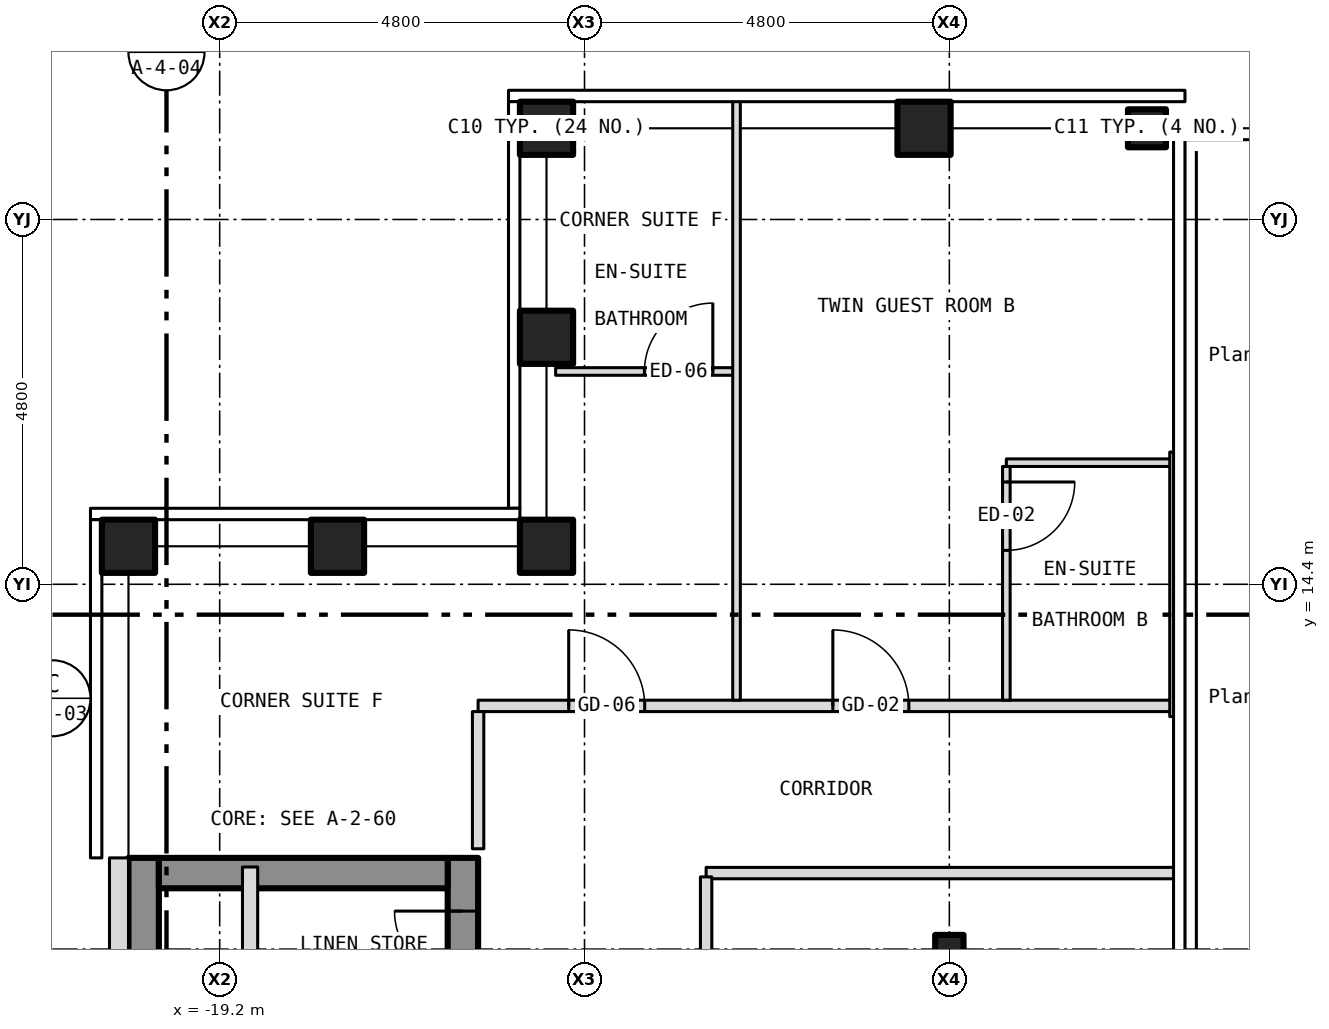
"""IFC4 building model, lengths in metres.
Left out: names, types, materials, properties, quantities, classifications, styles, units other than length and angle.
Written with IfcOpenShell. Run it as: python <this file> out.ifc"""

import sys

from ifc_helpers import new_model, si_unit, direction, frame, frame_2d, origin, origin_2d, place, context, subcontext, project, spatial, rectangle, hollow_rectangle, i_section, extrude, element, fill, save


model = new_model("IFC4")
c1 = context("Model", 3, precision=1e-05, world=origin(), true_north=direction((0.0, 1.0)))
c2 = subcontext(c1, "Body", "Model", "MODEL_VIEW")
j1 = project(units=[si_unit("LENGTHUNIT", "METRE"), si_unit("PLANEANGLEUNIT", "RADIAN")], contexts=[c1])
p1 = place(None, origin())
s1 = spatial("IfcSite", under=j1, at=p1, CompositionType="ELEMENT")
p2 = place(p1, origin())
s2 = spatial("IfcBuilding", under=s1, at=p2, CompositionType="ELEMENT")
p3 = place(p2, frame((0.0, 0.0, 219.0)))
s3 = spatial("IfcBuildingStorey", under=s2, at=p3, CompositionType="ELEMENT", Elevation=219.0)
for number, where, z_axis, x_axis in (
    (1, (-14.9, 20.4, -0.15), (0.0, 0.0, 1.0), (1.0, 0.0, 0.0)),
    (2, (-9.933, 20.4, -0.15), (0.0, 0.0, 1.0), (1.0, 0.0, 0.0)),
    (3, (-20.4, 14.9, -0.15), (0.0, 0.0, 1.0), (1.0, 0.0, 0.0)),
    (4, (-14.9, 14.9, -0.15), (0.0, 0.0, 1.0), (1.0, 0.0, 0.0)),
    (5, (-14.9, 17.65, -0.15), (0.0, 0.0, 1.0), (1.0, 0.0, 0.0)),
    (6, (-17.65, 14.9, -0.15), (0.0, 0.0, 1.0), (1.0, 0.0, 0.0)),
):
    element("IfcColumn", number, at=place(p3, frame(where, z_axis=z_axis, x_axis=x_axis)), inside=s3, PredefinedType="COLUMN", context=c2, shape_type="SweptSolid", body=[
        extrude(hollow_rectangle(XDim=0.7, YDim=0.7, WallThickness=0.04, at=origin_2d()), origin(), (0.0, 0.0, 1.0), 3.5),
    ])
p4 = place(p3, frame((-7.0, 20.4, -0.15), z_axis=(0.0, 0.0, 1.0), x_axis=(1.0, 0.0, 0.0)))
e7 = element("IfcColumn", 7, at=p4, inside=s3, PredefinedType="COLUMN", context=c2, shape_type="SweptSolid", body=[
    extrude(hollow_rectangle(XDim=0.5, YDim=0.5, WallThickness=0.03, at=origin_2d()), origin(), (0.0, 0.0, 1.0), 3.5),
])
p5 = place(p3, frame((-9.6, 9.6, -0.15), z_axis=(0.0, 0.0, 1.0), x_axis=(1.0, 0.0, 0.0)))
e8 = element("IfcColumn", 8, at=p5, inside=s3, PredefinedType="COLUMN", context=c2, shape_type="SweptSolid", body=[
    extrude(i_section(OverallWidth=0.373, OverallDepth=0.373, WebThickness=0.016, FlangeThickness=0.026, at=origin_2d()), origin(), (0.0, 0.0, 1.0), 3.5),
])
p6 = place(p3, frame((-16.0, -10.8, 0.0), z_axis=(0.0, 0.0, 1.0), x_axis=(0.0, 1.0, 0.0)))
e9 = element("IfcWall", 9, at=p6, inside=s3, PredefinedType="SHEAR", context=c2, shape_type="SweptSolid", body=[
    extrude(rectangle(XDim=21.6, YDim=0.4, at=frame_2d((10.8, 0.0))), origin(), (0.0, 0.0, 1.0), 3.25),
])
p7 = place(p6, frame((9.4, 0.0, 0.0)))
e10 = element("IfcOpeningElement", 10, at=p7, cuts=e9, PredefinedType="OPENING", context=c2, shape_type="SweptSolid", body=[
    extrude(rectangle(XDim=1.1, YDim=2.1, at=frame_2d((0.55, 1.05))), frame((0.0, 0.212, 0.0), z_axis=(0.0, -1.0, 0.0), x_axis=(1.0, 0.0, 0.0)), (0.0, 0.0, 1.0), 0.424),
])
p8 = place(p6, frame((11.5, 0.0, 0.0)))
e11 = element("IfcOpeningElement", 11, at=p8, cuts=e9, PredefinedType="OPENING", context=c2, shape_type="SweptSolid", body=[
    extrude(rectangle(XDim=1.1, YDim=2.1, at=frame_2d((0.55, 1.05))), frame((0.0, 0.212, 0.0), z_axis=(0.0, -1.0, 0.0), x_axis=(1.0, 0.0, 0.0)), (0.0, 0.0, 1.0), 0.424),
])
p9 = place(p6, frame((13.6, 0.0, 0.0)))
e12 = element("IfcOpeningElement", 12, at=p9, cuts=e9, PredefinedType="OPENING", context=c2, shape_type="SweptSolid", body=[
    extrude(rectangle(XDim=1.1, YDim=2.1, at=frame_2d((0.55, 1.05))), frame((0.0, 0.212, 0.0), z_axis=(0.0, -1.0, 0.0), x_axis=(1.0, 0.0, 0.0)), (0.0, 0.0, 1.0), 0.424),
])
p10 = place(p6, frame((15.7, 0.0, 0.0)))
e13 = element("IfcOpeningElement", 13, at=p10, cuts=e9, PredefinedType="OPENING", context=c2, shape_type="SweptSolid", body=[
    extrude(rectangle(XDim=1.1, YDim=2.1, at=frame_2d((0.55, 1.05))), frame((0.0, 0.212, 0.0), z_axis=(0.0, -1.0, 0.0), x_axis=(1.0, 0.0, 0.0)), (0.0, 0.0, 1.0), 0.424),
])
p11 = place(p6, frame((17.8, 0.0, 0.0)))
e14 = element("IfcOpeningElement", 14, at=p11, cuts=e9, PredefinedType="OPENING", context=c2, shape_type="SweptSolid", body=[
    extrude(rectangle(XDim=1.1, YDim=2.1, at=frame_2d((0.55, 1.05))), frame((0.0, 0.212, 0.0), z_axis=(0.0, -1.0, 0.0), x_axis=(1.0, 0.0, 0.0)), (0.0, 0.0, 1.0), 0.424),
])
p12 = place(p6, frame((0.458, 0.0, 0.0)))
e15 = element("IfcOpeningElement", 15, at=p12, cuts=e9, PredefinedType="OPENING", context=c2, shape_type="SweptSolid", body=[
    extrude(rectangle(XDim=1.1, YDim=2.1, at=frame_2d((0.55, 1.05))), frame((0.0, 0.212, 0.0), z_axis=(0.0, -1.0, 0.0), x_axis=(1.0, 0.0, 0.0)), (0.0, 0.0, 1.0), 0.424),
])
p13 = place(p6, frame((7.5, 0.0, 0.0)))
e16 = element("IfcOpeningElement", 16, at=p13, cuts=e9, PredefinedType="OPENING", context=c2, shape_type="SweptSolid", body=[
    extrude(rectangle(XDim=1.1, YDim=2.1, at=frame_2d((0.55, 1.05))), frame((0.0, 0.212, 0.0), z_axis=(0.0, -1.0, 0.0), x_axis=(1.0, 0.0, 0.0)), (0.0, 0.0, 1.0), 0.424),
])
p14 = place(p6, frame((20.0, 0.0, 0.0)))
e17 = element("IfcOpeningElement", 17, at=p14, cuts=e9, PredefinedType="OPENING", context=c2, shape_type="SweptSolid", body=[
    extrude(rectangle(XDim=0.9, YDim=2.1, at=frame_2d((0.45, 1.05))), frame((0.0, 0.212, 0.0), z_axis=(0.0, -1.0, 0.0), x_axis=(1.0, 0.0, 0.0)), (0.0, 0.0, 1.0), 0.424),
])
p15 = place(p3, frame((-20.2, -10.8, 0.0), z_axis=(0.0, 0.0, 1.0), x_axis=(0.0, 1.0, 0.0)))
e18 = element("IfcWall", 18, at=p15, inside=s3, PredefinedType="SHEAR", context=c2, shape_type="SweptSolid", body=[
    extrude(rectangle(XDim=21.6, YDim=0.4, at=frame_2d((10.8, 0.0))), origin(), (0.0, 0.0, 1.0), 3.25),
])
p16 = place(p3, frame((-20.0, 10.6, 0.0), z_axis=(0.0, 0.0, 1.0), x_axis=(1.0, 0.0, 0.0)))
e19 = element("IfcWall", 19, at=p16, inside=s3, PredefinedType="SHEAR", context=c2, shape_type="SweptSolid", body=[
    extrude(rectangle(XDim=3.8, YDim=0.4, at=frame_2d((1.9, 0.0))), origin(), (0.0, 0.0, 1.0), 3.25),
])
p17 = place(p3, frame((-20.525, 10.8, 0.0), z_axis=(0.0, 0.0, 1.0), x_axis=(0.0, -1.0, 0.0)))
e20 = element("IfcWall", 20, at=p17, inside=s3, PredefinedType="SOLIDWALL", context=c2, shape_type="SweptSolid", body=[
    extrude(rectangle(XDim=21.6, YDim=0.25, at=frame_2d((10.8, 0.0))), origin(), (0.0, 0.0, 1.0), 3.5),
])
p18 = place(p17, frame((18.05, 0.0, 1.0)))
e21 = element("IfcOpeningElement", 21, at=p18, cuts=e20, PredefinedType="OPENING", context=c2, shape_type="SweptSolid", body=[
    extrude(rectangle(XDim=0.6, YDim=1.5, at=frame_2d((0.3, 0.75))), frame((0.0, 0.137, 0.0), z_axis=(0.0, -1.0, 0.0), x_axis=(1.0, 0.0, 0.0)), (0.0, 0.0, 1.0), 0.274),
])
p19 = place(p3, frame((-12.8, 10.6, 0.0), z_axis=(0.0, 0.0, 1.0), x_axis=(1.0, 0.0, 0.0)))
e22 = element("IfcWall", 22, at=p19, inside=s3, PredefinedType="PARTITIONING", context=c2, shape_type="SweptSolid", body=[
    extrude(rectangle(XDim=6.18, YDim=0.15, at=frame_2d((3.09, 0.0))), origin(), (0.0, 0.0, 1.0), 3.35),
])
p20 = place(p3, frame((-15.8, 12.8, 0.0), z_axis=(0.0, 0.0, 1.0), x_axis=(1.0, 0.0, 0.0)))
e23 = element("IfcWall", 23, at=p20, inside=s3, PredefinedType="PARTITIONING", context=c2, shape_type="SweptSolid", body=[
    extrude(rectangle(XDim=9.15, YDim=0.15, at=frame_2d((4.575, 0.0))), origin(), (0.0, 0.0, 1.0), 3.35),
])
p21 = place(p20, frame((4.667, 0.0, 0.0)))
e24 = element("IfcOpeningElement", 24, at=p21, cuts=e23, PredefinedType="OPENING", context=c2, shape_type="SweptSolid", body=[
    extrude(rectangle(XDim=1.0, YDim=2.1, at=frame_2d((0.5, 1.05))), frame((0.0, 0.087, 0.0), z_axis=(0.0, -1.0, 0.0), x_axis=(1.0, 0.0, 0.0)), (0.0, 0.0, 1.0), 0.174),
])
p22 = place(p20, frame((1.192, 0.0, 0.0)))
e25 = element("IfcOpeningElement", 25, at=p22, cuts=e23, PredefinedType="OPENING", context=c2, shape_type="SweptSolid", body=[
    extrude(rectangle(XDim=1.0, YDim=2.1, at=frame_2d((0.5, 1.05))), frame((0.0, 0.087, 0.0), z_axis=(0.0, -1.0, 0.0), x_axis=(1.0, 0.0, 0.0)), (0.0, 0.0, 1.0), 0.174),
])
p23 = place(p3, frame((-8.85, 16.0, 0.0), z_axis=(0.0, 0.0, 1.0), x_axis=(1.0, 0.0, 0.0)))
e26 = element("IfcWall", 26, at=p23, inside=s3, PredefinedType="PARTITIONING", context=c2, shape_type="SweptSolid", body=[
    extrude(rectangle(XDim=2.2, YDim=0.1, at=frame_2d((1.1, 0.0))), origin(), (0.0, 0.0, 1.0), 3.35),
])
p24 = place(p3, frame((-14.78, 17.2, 0.0), z_axis=(0.0, 0.0, 1.0), x_axis=(1.0, 0.0, 0.0)))
e27 = element("IfcWall", 27, at=p24, inside=s3, PredefinedType="PARTITIONING", context=c2, shape_type="SweptSolid", body=[
    extrude(rectangle(XDim=2.38, YDim=0.1, at=frame_2d((1.19, 0.0))), origin(), (0.0, 0.0, 1.0), 3.35),
])
p25 = place(p24, frame((1.168, 0.0, 0.0)))
e28 = element("IfcOpeningElement", 28, at=p25, cuts=e27, PredefinedType="OPENING", context=c2, shape_type="SweptSolid", body=[
    extrude(rectangle(XDim=0.9, YDim=2.1, at=frame_2d((0.45, 1.05))), frame((0.0, 0.062, 0.0), z_axis=(0.0, -1.0, 0.0), x_axis=(1.0, 0.0, 0.0)), (0.0, 0.0, 1.0), 0.124),
])
p26 = place(p3, frame((-18.8, -1.8, 0.0), z_axis=(0.0, 0.0, 1.0), x_axis=(0.0, 1.0, 0.0)))
e29 = element("IfcWall", 29, at=p26, inside=s3, PredefinedType="PARTITIONING", context=c2, shape_type="SweptSolid", body=[
    extrude(rectangle(XDim=12.48, YDim=0.2, at=frame_2d((6.24, 0.0))), origin(), (0.0, 0.0, 1.0), 3.25),
])
p27 = place(p3, frame((-15.8, 10.92, 0.0), z_axis=(0.0, 0.0, 1.0), x_axis=(0.0, 1.0, 0.0)))
e30 = element("IfcWall", 30, at=p27, inside=s3, PredefinedType="PARTITIONING", context=c2, shape_type="SweptSolid", body=[
    extrude(rectangle(XDim=1.805, YDim=0.15, at=frame_2d((0.903, 0.0))), origin(), (0.0, 0.0, 1.0), 3.35),
])
p28 = place(p3, frame((-12.8, 3.375, 0.0), z_axis=(0.0, 0.0, 1.0), x_axis=(0.0, 1.0, 0.0)))
e31 = element("IfcWall", 31, at=p28, inside=s3, PredefinedType="PARTITIONING", context=c2, shape_type="SweptSolid", body=[
    extrude(rectangle(XDim=7.175, YDim=0.15, at=frame_2d((3.587, 0.0))), origin(), (0.0, 0.0, 1.0), 3.35),
])
p29 = place(p28, frame((3.125, 0.0, 0.0)))
e32 = element("IfcOpeningElement", 32, at=p29, cuts=e31, PredefinedType="OPENING", context=c2, shape_type="SweptSolid", body=[
    extrude(rectangle(XDim=0.9, YDim=2.1, at=frame_2d((0.45, 1.05))), frame((0.0, 0.087, 0.0), z_axis=(0.0, -1.0, 0.0), x_axis=(1.0, 0.0, 0.0)), (0.0, 0.0, 1.0), 0.174),
])
p30 = place(p3, frame((-12.4, 12.875, 0.0), z_axis=(0.0, 0.0, 1.0), x_axis=(0.0, 1.0, 0.0)))
e33 = element("IfcWall", 33, at=p30, inside=s3, PredefinedType="PARTITIONING", context=c2, shape_type="SweptSolid", body=[
    extrude(rectangle(XDim=7.905, YDim=0.1, at=frame_2d((3.953, 0.0))), origin(), (0.0, 0.0, 1.0), 3.35),
])
p31 = place(p3, frame((-8.85, 12.875, 0.0), z_axis=(0.0, 0.0, 1.0), x_axis=(0.0, 1.0, 0.0)))
e34 = element("IfcWall", 34, at=p31, inside=s3, PredefinedType="PARTITIONING", context=c2, shape_type="SweptSolid", body=[
    extrude(rectangle(XDim=3.075, YDim=0.1, at=frame_2d((1.538, 0.0))), origin(), (0.0, 0.0, 1.0), 3.35),
])
p32 = place(p31, frame((1.971, 0.0, 0.0)))
e35 = element("IfcOpeningElement", 35, at=p32, cuts=e34, PredefinedType="OPENING", context=c2, shape_type="SweptSolid", body=[
    extrude(rectangle(XDim=0.9, YDim=2.1, at=frame_2d((0.45, 1.05))), frame((0.0, 0.062, 0.0), z_axis=(0.0, -1.0, 0.0), x_axis=(1.0, 0.0, 0.0)), (0.0, 0.0, 1.0), 0.124),
])
p33 = place(p3, frame((-6.65, 12.66, 0.0), z_axis=(0.0, 0.0, 1.0), x_axis=(0.0, 1.0, 0.0)))
e36 = element("IfcWall", 36, at=p33, inside=s3, PredefinedType="PARTITIONING", context=c2, shape_type="SweptSolid", body=[
    extrude(rectangle(XDim=3.48, YDim=0.1, at=frame_2d((1.74, 0.0))), origin(), (0.0, 0.0, 1.0), 3.35),
])
p34 = place(p14, origin())
e37 = element("IfcDoor", 37, at=p34, inside=s3, OperationType="SINGLE_SWING_RIGHT", PredefinedType="DOOR", context=c2, shape_type="SweptSolid", body=[
    extrude(rectangle(XDim=0.9, YDim=2.1, at=frame_2d((0.45, 1.05))), frame((0.0, 0.025, 0.0), z_axis=(0.0, -1.0, 0.0), x_axis=(1.0, 0.0, 0.0)), (0.0, 0.0, 1.0), 0.05),
])
fill(e17, e37)
p35 = place(p21, origin())
e38 = element("IfcDoor", 38, at=p35, inside=s3, OperationType="SINGLE_SWING_LEFT", PredefinedType="DOOR", context=c2, shape_type="SweptSolid", body=[
    extrude(rectangle(XDim=1.0, YDim=2.1, at=frame_2d((0.5, 1.05))), frame((0.0, 0.025, 0.0), z_axis=(0.0, -1.0, 0.0), x_axis=(1.0, 0.0, 0.0)), (0.0, 0.0, 1.0), 0.05),
])
fill(e24, e38)
p36 = place(p32, origin())
e39 = element("IfcDoor", 39, at=p36, inside=s3, OperationType="SINGLE_SWING_RIGHT", PredefinedType="DOOR", context=c2, shape_type="SweptSolid", body=[
    extrude(rectangle(XDim=0.9, YDim=2.1, at=frame_2d((0.45, 1.05))), frame((0.0, 0.025, 0.0), z_axis=(0.0, -1.0, 0.0), x_axis=(1.0, 0.0, 0.0)), (0.0, 0.0, 1.0), 0.05),
])
fill(e35, e39)
p37 = place(p25, origin())
e40 = element("IfcDoor", 40, at=p37, inside=s3, OperationType="SINGLE_SWING_RIGHT", PredefinedType="DOOR", context=c2, shape_type="SweptSolid", body=[
    extrude(rectangle(XDim=0.9, YDim=2.1, at=frame_2d((0.45, 1.05))), frame((0.0, 0.025, 0.0), z_axis=(0.0, -1.0, 0.0), x_axis=(1.0, 0.0, 0.0)), (0.0, 0.0, 1.0), 0.05),
])
fill(e28, e40)
p38 = place(p22, origin())
e41 = element("IfcDoor", 41, at=p38, inside=s3, OperationType="SINGLE_SWING_LEFT", PredefinedType="DOOR", context=c2, shape_type="SweptSolid", body=[
    extrude(rectangle(XDim=1.0, YDim=2.1, at=frame_2d((0.5, 1.05))), frame((0.0, 0.025, 0.0), z_axis=(0.0, -1.0, 0.0), x_axis=(1.0, 0.0, 0.0)), (0.0, 0.0, 1.0), 0.05),
])
fill(e25, e41)
save(model, sys.argv[1])
